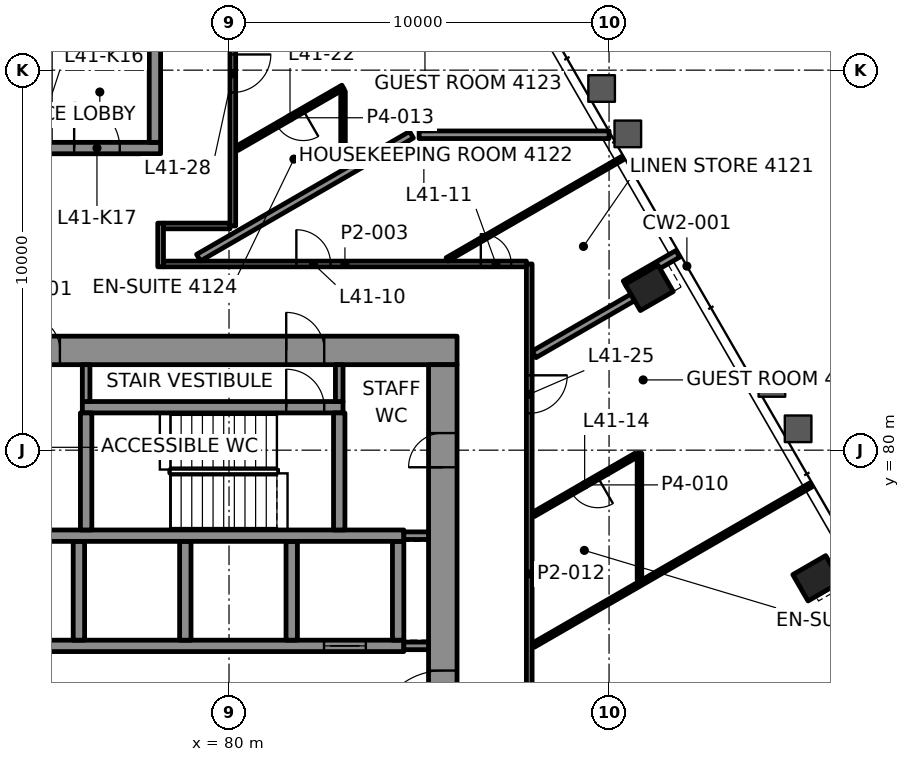
"""IFC4 building model, lengths in metres.
Left out: names, types, materials, properties, quantities, classifications, styles, units other than length and angle.
Written with IfcOpenShell. Run it as: python <this file> out.ifc"""

import sys

from ifc_helpers import new_model, si_unit, direction, frame, frame_2d, origin, origin_2d, place, context, subcontext, project, spatial, rectangle, hollow_rectangle, extrude, element, fill, save


model = new_model("IFC4")
c1 = context("Model", 3, precision=1e-05, world=origin(), true_north=direction((0.0, 1.0)))
c2 = subcontext(c1, "Body", "Model", "MODEL_VIEW")
j1 = project(units=[si_unit("LENGTHUNIT", "METRE"), si_unit("PLANEANGLEUNIT", "RADIAN")], contexts=[c1])
p1 = place(None, origin())
s1 = spatial("IfcSite", under=j1, at=p1, CompositionType="ELEMENT")
p2 = place(p1, origin())
s2 = spatial("IfcBuilding", under=s1, at=p2, CompositionType="ELEMENT")
p3 = place(p2, frame((0.0, 0.0, 179.2)))
s3 = spatial("IfcBuildingStorey", under=s2, at=p3, CompositionType="ELEMENT", Elevation=179.2)
for number, where, z_axis, x_axis in (
    (1, (95.468, 76.628, -0.0), (0.0, 0.0, 1.0), (-0.5, 0.866, 0.0)),
    (2, (91.056, 84.27, -0.0), (0.0, 0.0, 1.0), (-0.5, 0.866, 0.0)),
):
    element("IfcColumn", number, at=place(p3, frame(where, z_axis=z_axis, x_axis=x_axis)), inside=s3, PredefinedType="COLUMN", context=c2, shape_type="SweptSolid", body=[
        extrude(hollow_rectangle(XDim=0.8, YDim=1.0, WallThickness=0.05, at=origin_2d()), origin(), (0.0, 0.0, 1.0), 3.9),
    ])
p4 = place(p3, frame((64.0, 82.625, 0.0), z_axis=(0.0, 0.0, 1.0), x_axis=(1.0, 0.0, 0.0)))
e3 = element("IfcWall", 3, at=p4, inside=s3, PredefinedType="SHEAR", context=c2, shape_type="SweptSolid", body=[
    extrude(rectangle(XDim=22.0, YDim=0.75, at=frame_2d((11.0, 0.0))), origin(), (0.0, 0.0, 1.0), 3.7),
])
p5 = place(p4, frame((3.695, 0.0, 0.0)))
e4 = element("IfcOpeningElement", 4, at=p5, cuts=e3, PredefinedType="OPENING", context=c2, shape_type="SweptSolid", body=[
    extrude(rectangle(XDim=1.0, YDim=2.1, at=frame_2d((0.5, 1.05))), frame((0.0, 0.385, 0.0), z_axis=(0.0, -1.0, 0.0), x_axis=(1.0, 0.0, 0.0)), (0.0, 0.0, 1.0), 0.77),
])
p6 = place(p4, frame((17.505, 0.0, 0.0)))
e5 = element("IfcOpeningElement", 5, at=p6, cuts=e3, PredefinedType="OPENING", context=c2, shape_type="SweptSolid", body=[
    extrude(rectangle(XDim=1.0, YDim=2.1, at=frame_2d((0.5, 1.05))), frame((0.0, 0.385, 0.0), z_axis=(0.0, -1.0, 0.0), x_axis=(1.0, 0.0, 0.0)), (0.0, 0.0, 1.0), 0.77),
])
p7 = place(p4, frame((10.65, 0.0, 0.0)))
e6 = element("IfcOpeningElement", 6, at=p7, cuts=e3, PredefinedType="OPENING", context=c2, shape_type="SweptSolid", body=[
    extrude(rectangle(XDim=0.9, YDim=2.1, at=frame_2d((0.45, 1.05))), frame((0.0, 0.385, 0.0), z_axis=(0.0, -1.0, 0.0), x_axis=(1.0, 0.0, 0.0)), (0.0, 0.0, 1.0), 0.77),
])
p8 = place(p3, frame((85.625, 67.75, 0.0), z_axis=(0.0, 0.0, 1.0), x_axis=(0.0, 1.0, 0.0)))
e7 = element("IfcWall", 7, at=p8, inside=s3, PredefinedType="SHEAR", context=c2, shape_type="SweptSolid", body=[
    extrude(rectangle(XDim=14.5, YDim=0.75, at=frame_2d((7.25, 0.0))), origin(), (0.0, 0.0, 1.0), 3.7),
])
p9 = place(p8, frame((4.65, 0.0, 0.0)))
e8 = element("IfcOpeningElement", 8, at=p9, cuts=e7, PredefinedType="OPENING", context=c2, shape_type="SweptSolid", body=[
    extrude(rectangle(XDim=1.8, YDim=2.1, at=frame_2d((0.9, 1.05))), frame((0.0, 0.385, 0.0), z_axis=(0.0, -1.0, 0.0), x_axis=(1.0, 0.0, 0.0)), (0.0, 0.0, 1.0), 0.77),
])
p10 = place(p8, frame((11.8, 0.0, 0.0)))
e9 = element("IfcOpeningElement", 9, at=p10, cuts=e7, PredefinedType="OPENING", context=c2, shape_type="SweptSolid", body=[
    extrude(rectangle(XDim=0.9, YDim=2.1, at=frame_2d((0.45, 1.05))), frame((0.0, 0.385, 0.0), z_axis=(0.0, -1.0, 0.0), x_axis=(1.0, 0.0, 0.0)), (0.0, 0.0, 1.0), 0.77),
])
p11 = place(p3, frame((70.3, 74.85, 0.0), z_axis=(0.0, 0.0, 1.0), x_axis=(1.0, 0.0, 0.0)))
e10 = element("IfcWall", 10, at=p11, inside=s3, PredefinedType="SHEAR", context=c2, shape_type="SweptSolid", body=[
    extrude(rectangle(XDim=14.3, YDim=0.3, at=frame_2d((7.15, 0.0))), origin(), (0.0, 0.0, 1.0), 3.7),
])
p12 = place(p11, frame((3.8, 0.0, 0.0)))
e11 = element("IfcOpeningElement", 11, at=p12, cuts=e10, PredefinedType="OPENING", context=c2, shape_type="SweptSolid", body=[
    extrude(rectangle(XDim=1.1, YDim=2.1, at=frame_2d((0.55, 1.05))), frame((0.0, 0.16, 0.0), z_axis=(0.0, -1.0, 0.0), x_axis=(1.0, 0.0, 0.0)), (0.0, 0.0, 1.0), 0.32),
])
p13 = place(p11, frame((12.2, 0.0, 0.0)))
e12 = element("IfcOpeningElement", 12, at=p13, cuts=e10, PredefinedType="OPENING", context=c2, shape_type="SweptSolid", body=[
    extrude(rectangle(XDim=1.1, YDim=2.1, at=frame_2d((0.55, 1.05))), frame((0.0, 0.16, 0.0), z_axis=(0.0, -1.0, 0.0), x_axis=(1.0, 0.0, 0.0)), (0.0, 0.0, 1.0), 0.32),
])
for number, where, z_axis, x_axis in (
    (13, (76.05, 75.0, 0.0), (0.0, 0.0, 1.0), (0.0, 1.0, 0.0)),
    (14, (78.85, 75.0, 0.0), (0.0, 0.0, 1.0), (0.0, 1.0, 0.0)),
    (15, (81.65, 75.0, 0.0), (0.0, 0.0, 1.0), (0.0, 1.0, 0.0)),
    (16, (84.45, 75.0, 0.0), (0.0, 0.0, 1.0), (0.0, 1.0, 0.0)),
):
    element("IfcWall", number, at=place(p3, frame(where, z_axis=z_axis, x_axis=x_axis)), inside=s3, PredefinedType="SHEAR", context=c2, shape_type="SweptSolid", body=[
        extrude(rectangle(XDim=2.6, YDim=0.3, at=frame_2d((1.3, 0.0))), origin(), (0.0, 0.0, 1.0), 3.7),
    ])
p14 = place(p3, frame((67.15, 77.75, 0.0), z_axis=(0.0, 0.0, 1.0), x_axis=(1.0, 0.0, 0.0)))
e17 = element("IfcWall", 17, at=p14, inside=s3, PredefinedType="SHEAR", context=c2, shape_type="SweptSolid", body=[
    extrude(rectangle(XDim=17.45, YDim=0.3, at=frame_2d((8.725, 0.0))), origin(), (0.0, 0.0, 1.0), 3.7),
])
p15 = place(p14, frame((0.545, 0.0, 0.0)))
e18 = element("IfcOpeningElement", 18, at=p15, cuts=e17, PredefinedType="OPENING", context=c2, shape_type="SweptSolid", body=[
    extrude(rectangle(XDim=1.0, YDim=2.1, at=frame_2d((0.5, 1.05))), frame((0.0, 0.16, 0.0), z_axis=(0.0, -1.0, 0.0), x_axis=(1.0, 0.0, 0.0)), (0.0, 0.0, 1.0), 0.32),
])
p16 = place(p3, frame((76.14, 81.13, 0.0), z_axis=(0.0, 0.0, 1.0), x_axis=(1.0, 0.0, 0.0)))
e19 = element("IfcWall", 19, at=p16, inside=s3, PredefinedType="SHEAR", context=c2, shape_type="SweptSolid", body=[
    extrude(rectangle(XDim=6.86, YDim=0.3, at=frame_2d((3.43, 0.0))), origin(), (0.0, 0.0, 1.0), 3.7),
])
p17 = place(p16, frame((5.365, 0.0, 0.0)))
e20 = element("IfcOpeningElement", 20, at=p17, cuts=e19, PredefinedType="OPENING", context=c2, shape_type="SweptSolid", body=[
    extrude(rectangle(XDim=1.0, YDim=2.1, at=frame_2d((0.5, 1.05))), frame((0.0, 0.16, 0.0), z_axis=(0.0, -1.0, 0.0), x_axis=(1.0, 0.0, 0.0)), (0.0, 0.0, 1.0), 0.32),
])
for number, where, z_axis, x_axis in (
    (21, (76.24, 77.9, 0.0), (0.0, 0.0, 1.0), (0.0, 1.0, 0.0)),
    (22, (82.9, 77.9, 0.0), (0.0, 0.0, 1.0), (0.0, 1.0, 0.0)),
):
    element("IfcWall", number, at=place(p3, frame(where, z_axis=z_axis, x_axis=x_axis)), inside=s3, PredefinedType="SHEAR", context=c2, shape_type="SweptSolid", body=[
        extrude(rectangle(XDim=3.08, YDim=0.3, at=frame_2d((1.54, 0.0))), origin(), (0.0, 0.0, 1.0), 3.7),
    ])
p18 = place(p3, frame((71.8, 87.95, 0.0), z_axis=(0.0, 0.0, 1.0), x_axis=(1.0, 0.0, 0.0)))
e23 = element("IfcWall", 23, at=p18, inside=s3, PredefinedType="SHEAR", context=c2, shape_type="SweptSolid", body=[
    extrude(rectangle(XDim=6.4, YDim=0.3, at=frame_2d((3.2, 0.0))), origin(), (0.0, 0.0, 1.0), 3.7),
])
p19 = place(p18, frame((1.325, 0.0, 0.0)))
e24 = element("IfcOpeningElement", 24, at=p19, cuts=e23, PredefinedType="OPENING", context=c2, shape_type="SweptSolid", body=[
    extrude(rectangle(XDim=1.0, YDim=2.1, at=frame_2d((0.5, 1.05))), frame((0.0, 0.16, 0.0), z_axis=(0.0, -1.0, 0.0), x_axis=(1.0, 0.0, 0.0)), (0.0, 0.0, 1.0), 0.32),
])
p20 = place(p18, frame((4.125, 0.0, 0.0)))
e25 = element("IfcOpeningElement", 25, at=p20, cuts=e23, PredefinedType="OPENING", context=c2, shape_type="SweptSolid", body=[
    extrude(rectangle(XDim=1.2, YDim=2.1, at=frame_2d((0.6, 1.05))), frame((0.0, 0.16, 0.0), z_axis=(0.0, -1.0, 0.0), x_axis=(1.0, 0.0, 0.0)), (0.0, 0.0, 1.0), 0.32),
])
p21 = place(p3, frame((78.05, 88.1, 0.0), z_axis=(0.0, 0.0, 1.0), x_axis=(0.0, 1.0, 0.0)))
e26 = element("IfcWall", 26, at=p21, inside=s3, PredefinedType="SHEAR", context=c2, shape_type="SweptSolid", body=[
    extrude(rectangle(XDim=6.2, YDim=0.3, at=frame_2d((3.1, 0.0))), origin(), (0.0, 0.0, 1.0), 3.7),
])
p22 = place(p3, frame((78.275, 84.9, 0.0), z_axis=(0.0, 0.0, 1.0), x_axis=(1.0, 0.0, 0.0)))
e27 = element("IfcWall", 27, at=p22, inside=s3, PredefinedType="PARTITIONING", context=c2, shape_type="SweptSolid", body=[
    extrude(rectangle(XDim=9.55, YDim=0.15, at=frame_2d((4.775, 0.0))), origin(), (0.0, 0.0, 1.0), 3.1),
])
p23 = place(p22, frame((3.497, 0.0, 0.0)))
e28 = element("IfcOpeningElement", 28, at=p23, cuts=e27, PredefinedType="OPENING", context=c2, shape_type="SweptSolid", body=[
    extrude(rectangle(XDim=0.9, YDim=2.1, at=frame_2d((0.45, 1.05))), frame((0.0, 0.085, 0.0), z_axis=(0.0, -1.0, 0.0), x_axis=(1.0, 0.0, 0.0)), (0.0, 0.0, 1.0), 0.17),
])
p24 = place(p22, frame((8.351, 0.0, 0.0)))
e29 = element("IfcOpeningElement", 29, at=p24, cuts=e27, PredefinedType="OPENING", context=c2, shape_type="SweptSolid", body=[
    extrude(rectangle(XDim=0.8, YDim=2.1, at=frame_2d((0.4, 1.05))), frame((0.0, 0.085, 0.0), z_axis=(0.0, -1.0, 0.0), x_axis=(1.0, 0.0, 0.0)), (0.0, 0.0, 1.0), 0.17),
])
p25 = place(p3, frame((78.275, 85.9, 0.0), z_axis=(0.0, 0.0, 1.0), x_axis=(1.0, 0.0, 0.0)))
e30 = element("IfcWall", 30, at=p25, inside=s3, PredefinedType="PARTITIONING", context=c2, shape_type="SweptSolid", body=[
    extrude(rectangle(XDim=1.75, YDim=0.15, at=frame_2d((0.875, 0.0))), origin(), (0.0, 0.0, 1.0), 3.1),
])
p26 = place(p3, frame((83.06, 87.8, 0.0), z_axis=(0.0, 0.0, 1.0), x_axis=(1.0, 0.0, 0.0)))
e31 = element("IfcWall", 31, at=p26, inside=s3, PredefinedType="PARTITIONING", context=c2, shape_type="SweptSolid", body=[
    extrude(rectangle(XDim=0.564, YDim=0.12, at=frame_2d((0.282, 0.0))), origin(), (0.0, 0.0, 1.0), 3.1),
])
p27 = place(p3, frame((85.002, 88.3, 0.0), z_axis=(0.0, 0.0, 1.0), x_axis=(1.0, 0.0, 0.0)))
e32 = element("IfcWall", 32, at=p27, inside=s3, PredefinedType="PARTITIONING", context=c2, shape_type="SweptSolid", body=[
    extrude(rectangle(XDim=4.998, YDim=0.2, at=frame_2d((2.499, 0.0))), origin(), (0.0, 0.0, 1.0), 3.022),
])
p28 = place(p3, frame((88.01, 74.869, 0.0), z_axis=(0.0, 0.0, 1.0), x_axis=(0.866017924271, 0.500012954673, 0.0)))
e33 = element("IfcWall", 33, at=p28, inside=s3, PredefinedType="PARTITIONING", context=c2, shape_type="SweptSolid", body=[
    extrude(rectangle(XDim=8.439, YDim=0.12, at=frame_2d((4.219, 0.0))), origin(), (0.0, 0.0, 1.0), 3.022),
])
p29 = place(p3, frame((90.705, 79.865, 0.0), z_axis=(0.0, 0.0, 1.0), x_axis=(-0.866009247561, -0.500027982357, 0.0)))
e34 = element("IfcWall", 34, at=p29, inside=s3, PredefinedType="PARTITIONING", context=c2, shape_type="SweptSolid", body=[
    extrude(rectangle(XDim=3.113, YDim=0.12, at=frame_2d((1.556, 0.0))), origin(), (0.0, 0.0, 1.0), 3.1),
])
p30 = place(p29, frame((1.156, 0.0, 0.0)))
e35 = element("IfcOpeningElement", 35, at=p30, cuts=e34, PredefinedType="OPENING", context=c2, shape_type="SweptSolid", body=[
    extrude(rectangle(XDim=0.8, YDim=2.1, at=frame_2d((0.4, 1.05))), frame((0.0, 0.07, 0.0), z_axis=(0.0, -1.0, 0.0), x_axis=(1.0, 0.0, 0.0)), (0.0, 0.0, 1.0), 0.14),
])
p31 = place(p3, frame((88.027, 82.521, 0.0), z_axis=(0.0, 0.0, 1.0), x_axis=(0.866029639064, 0.499992664208, 0.0)))
e36 = element("IfcWall", 36, at=p31, inside=s3, PredefinedType="PARTITIONING", context=c2, shape_type="SweptSolid", body=[
    extrude(rectangle(XDim=2.998, YDim=0.2, at=frame_2d((1.499, 0.0))), origin(), (0.0, 0.0, 1.0), 3.1),
])
p32 = place(p3, frame((90.423, 84.367, 0.0), z_axis=(0.0, 0.0, 1.0), x_axis=(0.865989903783, 0.500061482766, 0.0)))
e37 = element("IfcWall", 37, at=p32, inside=s3, PredefinedType="PARTITIONING", context=c2, shape_type="SweptSolid", body=[
    extrude(rectangle(XDim=1.6, YDim=0.2, at=frame_2d((0.8, 0.0))), origin(), (0.0, 0.0, 1.0), 3.022),
])
p33 = place(p3, frame((85.737, 85.02, 0.0), z_axis=(0.0, 0.0, 1.0), x_axis=(0.8660338432, 0.499985382219, 0.0)))
e38 = element("IfcWall", 38, at=p33, inside=s3, PredefinedType="PARTITIONING", context=c2, shape_type="SweptSolid", body=[
    extrude(rectangle(XDim=5.332, YDim=0.1, at=frame_2d((2.666, 0.0))), origin(), (0.0, 0.0, 1.0), 3.022),
])
p34 = place(p3, frame((79.197, 85.065, 0.0), z_axis=(0.0, 0.0, 1.0), x_axis=(0.86602410867, 0.500002243197, 0.0)))
e39 = element("IfcWall", 39, at=p34, inside=s3, PredefinedType="PARTITIONING", context=c2, shape_type="SweptSolid", body=[
    extrude(rectangle(XDim=6.471, YDim=0.2, at=frame_2d((3.235, 0.0))), origin(), (0.0, 0.0, 1.0), 3.1),
])
p35 = place(p3, frame((83.0, 89.553, 0.0), z_axis=(0.0, 0.0, 1.0), x_axis=(-0.86604299788, -0.499969524894, 0.0)))
e40 = element("IfcWall", 40, at=p35, inside=s3, PredefinedType="PARTITIONING", context=c2, shape_type="SweptSolid", body=[
    extrude(rectangle(XDim=3.222, YDim=0.12, at=frame_2d((1.611, 0.0))), origin(), (0.0, 0.0, 1.0), 3.1),
])
p36 = place(p35, frame((1.211, 0.0, 0.0)))
e41 = element("IfcOpeningElement", 41, at=p36, cuts=e40, PredefinedType="OPENING", context=c2, shape_type="SweptSolid", body=[
    extrude(rectangle(XDim=0.8, YDim=2.1, at=frame_2d((0.4, 1.05))), frame((0.0, 0.07, 0.0), z_axis=(0.0, -1.0, 0.0), x_axis=(1.0, 0.0, 0.0)), (0.0, 0.0, 1.0), 0.14),
])
p37 = place(p3, frame((90.8, 76.59, 0.0), z_axis=(0.0, 0.0, 1.0), x_axis=(0.0, 1.0, 0.0)))
e42 = element("IfcWall", 42, at=p37, inside=s3, PredefinedType="PARTITIONING", context=c2, shape_type="SweptSolid", body=[
    extrude(rectangle(XDim=3.329, YDim=0.12, at=frame_2d((1.665, 0.0))), origin(), (0.0, 0.0, 1.0), 3.1),
])
p38 = place(p3, frame((87.9, 84.9, 0.0), z_axis=(0.0, 0.0, 1.0), x_axis=(0.0, -1.0, 0.0)))
e43 = element("IfcWall", 43, at=p38, inside=s3, PredefinedType="PARTITIONING", context=c2, shape_type="SweptSolid", body=[
    extrude(rectangle(XDim=16.308, YDim=0.15, at=frame_2d((8.154, 0.0))), origin(), (0.0, 0.0, 1.0), 3.1),
])
p39 = place(p38, frame((2.93, 0.0, 0.0)))
e44 = element("IfcOpeningElement", 44, at=p39, cuts=e43, PredefinedType="OPENING", context=c2, shape_type="SweptSolid", body=[
    extrude(rectangle(XDim=1.0, YDim=2.1, at=frame_2d((0.5, 1.05))), frame((0.0, 0.085, 0.0), z_axis=(0.0, -1.0, 0.0), x_axis=(1.0, 0.0, 0.0)), (0.0, 0.0, 1.0), 0.17),
])
p40 = place(p38, frame((12.5, 0.0, 0.0)))
e45 = element("IfcOpeningElement", 45, at=p40, cuts=e43, PredefinedType="OPENING", context=c2, shape_type="SweptSolid", body=[
    extrude(rectangle(XDim=1.2, YDim=2.1, at=frame_2d((0.6, 1.05))), frame((0.0, 0.085, 0.0), z_axis=(0.0, -1.0, 0.0), x_axis=(1.0, 0.0, 0.0)), (0.0, 0.0, 1.0), 0.17),
])
p41 = place(p3, frame((83.0, 87.8, 0.0), z_axis=(0.0, 0.0, 1.0), x_axis=(0.0, 1.0, 0.0)))
e46 = element("IfcWall", 46, at=p41, inside=s3, PredefinedType="PARTITIONING", context=c2, shape_type="SweptSolid", body=[
    extrude(rectangle(XDim=1.644, YDim=0.12, at=frame_2d((0.822, 0.0))), origin(), (0.0, 0.0, 1.0), 3.1),
])
p42 = place(p3, frame((80.1, 96.5, 0.0), z_axis=(0.0, 0.0, 1.0), x_axis=(0.0, -1.0, 0.0)))
e47 = element("IfcWall", 47, at=p42, inside=s3, PredefinedType="PARTITIONING", context=c2, shape_type="SweptSolid", body=[
    extrude(rectangle(XDim=10.6, YDim=0.15, at=frame_2d((5.3, 0.0))), origin(), (0.0, 0.0, 1.0), 3.022),
])
p43 = place(p42, frame((0.377, 0.0, 0.0)))
e48 = element("IfcOpeningElement", 48, at=p43, cuts=e47, PredefinedType="OPENING", context=c2, shape_type="SweptSolid", body=[
    extrude(rectangle(XDim=1.0, YDim=2.1, at=frame_2d((0.5, 1.05))), frame((0.0, 0.085, 0.0), z_axis=(0.0, -1.0, 0.0), x_axis=(1.0, 0.0, 0.0)), (0.0, 0.0, 1.0), 0.17),
])
p44 = place(p42, frame((6.087, 0.0, 0.0)))
e49 = element("IfcOpeningElement", 49, at=p44, cuts=e47, PredefinedType="OPENING", context=c2, shape_type="SweptSolid", body=[
    extrude(rectangle(XDim=1.0, YDim=2.1, at=frame_2d((0.5, 1.05))), frame((0.0, 0.085, 0.0), z_axis=(0.0, -1.0, 0.0), x_axis=(1.0, 0.0, 0.0)), (0.0, 0.0, 1.0), 0.17),
])
p45 = place(p3, frame((78.2, 84.825, 0.0), z_axis=(0.0, 0.0, 1.0), x_axis=(0.0, 1.0, 0.0)))
e50 = element("IfcWall", 50, at=p45, inside=s3, PredefinedType="PARTITIONING", context=c2, shape_type="SweptSolid", body=[
    extrude(rectangle(XDim=1.15, YDim=0.15, at=frame_2d((0.575, 0.0))), origin(), (0.0, 0.0, 1.0), 3.1),
])
for number, where, z_axis, x_axis in (
    (51, (84.6, 74.85, 0.0), (0.0, 0.0, 1.0), (1.0, 0.0, 0.0)),
    (52, (84.6, 77.75, 0.0), (0.0, 0.0, 1.0), (1.0, 0.0, 0.0)),
):
    element("IfcWall", number, at=place(p3, frame(where, z_axis=z_axis, x_axis=x_axis)), inside=s3, PredefinedType="PARTITIONING", context=c2, shape_type="SweptSolid", body=[
        extrude(rectangle(XDim=0.65, YDim=0.2, at=frame_2d((0.325, 0.0))), origin(), (0.0, 0.0, 1.0), 3.7),
    ])
for number, where, z_axis, x_axis in (
    (53, (76.24, 81.28, 0.0), (0.0, 0.0, 1.0), (0.0, 1.0, 0.0)),
    (54, (82.9, 81.28, 0.0), (0.0, 0.0, 1.0), (0.0, 1.0, 0.0)),
):
    element("IfcWall", number, at=place(p3, frame(where, z_axis=z_axis, x_axis=x_axis)), inside=s3, PredefinedType="PARTITIONING", context=c2, shape_type="SweptSolid", body=[
        extrude(rectangle(XDim=0.97, YDim=0.2, at=frame_2d((0.485, 0.0))), origin(), (0.0, 0.0, 1.0), 3.7),
    ])
p46 = place(p23, origin())
e55 = element("IfcDoor", 55, at=p46, inside=s3, OperationType="SINGLE_SWING_LEFT", PredefinedType="DOOR", context=c2, shape_type="SweptSolid", body=[
    extrude(rectangle(XDim=0.9, YDim=2.1, at=frame_2d((0.45, 1.05))), frame((0.0, 0.025, 0.0), z_axis=(0.0, -1.0, 0.0), x_axis=(1.0, 0.0, 0.0)), (0.0, 0.0, 1.0), 0.05),
])
fill(e28, e55)
p47 = place(p24, origin())
e56 = element("IfcDoor", 56, at=p47, inside=s3, OperationType="SINGLE_SWING_RIGHT", PredefinedType="DOOR", context=c2, shape_type="SweptSolid", body=[
    extrude(rectangle(XDim=0.8, YDim=2.1, at=frame_2d((0.4, 1.05))), frame((0.0, 0.025, 0.0), z_axis=(0.0, -1.0, 0.0), x_axis=(1.0, 0.0, 0.0)), (0.0, 0.0, 1.0), 0.05),
])
fill(e29, e56)
p48 = place(p30, origin())
e57 = element("IfcDoor", 57, at=p48, inside=s3, OperationType="SINGLE_SWING_RIGHT", PredefinedType="DOOR", context=c2, shape_type="SweptSolid", body=[
    extrude(rectangle(XDim=0.8, YDim=2.1, at=frame_2d((0.4, 1.05))), frame((0.0, 0.025, 0.0), z_axis=(0.0, -1.0, 0.0), x_axis=(1.0, 0.0, 0.0)), (0.0, 0.0, 1.0), 0.05),
])
fill(e35, e57)
p49 = place(p36, origin())
e58 = element("IfcDoor", 58, at=p49, inside=s3, OperationType="SINGLE_SWING_RIGHT", PredefinedType="DOOR", context=c2, shape_type="SweptSolid", body=[
    extrude(rectangle(XDim=0.8, YDim=2.1, at=frame_2d((0.4, 1.05))), frame((0.0, 0.025, 0.0), z_axis=(0.0, -1.0, 0.0), x_axis=(1.0, 0.0, 0.0)), (0.0, 0.0, 1.0), 0.05),
])
fill(e41, e58)
p50 = place(p39, origin())
e59 = element("IfcDoor", 59, at=p50, inside=s3, OperationType="SINGLE_SWING_LEFT", PredefinedType="DOOR", context=c2, shape_type="SweptSolid", body=[
    extrude(rectangle(XDim=1.0, YDim=2.1, at=frame_2d((0.5, 1.05))), frame((0.0, 0.025, 0.0), z_axis=(0.0, -1.0, 0.0), x_axis=(1.0, 0.0, 0.0)), (0.0, 0.0, 1.0), 0.05),
])
fill(e44, e59)
p51 = place(p44, origin())
e60 = element("IfcDoor", 60, at=p51, inside=s3, OperationType="SINGLE_SWING_LEFT", PredefinedType="DOOR", context=c2, shape_type="SweptSolid", body=[
    extrude(rectangle(XDim=1.0, YDim=2.1, at=frame_2d((0.5, 1.05))), frame((0.0, 0.025, 0.0), z_axis=(0.0, -1.0, 0.0), x_axis=(1.0, 0.0, 0.0)), (0.0, 0.0, 1.0), 0.05),
])
fill(e49, e60)
p52 = place(p13, origin())
e61 = element("IfcDoor", 61, at=p52, inside=s3, OperationType="DOUBLE_DOOR_SLIDING", PredefinedType="DOOR", context=c2, shape_type="SweptSolid", body=[
    extrude(rectangle(XDim=1.1, YDim=2.1, at=frame_2d((0.55, 1.05))), frame((0.0, 0.025, 0.0), z_axis=(0.0, -1.0, 0.0), x_axis=(1.0, 0.0, 0.0)), (0.0, 0.0, 1.0), 0.05),
])
fill(e12, e61)
p53 = place(p17, origin())
e62 = element("IfcDoor", 62, at=p53, inside=s3, OperationType="SINGLE_SWING_RIGHT", PredefinedType="DOOR", context=c2, shape_type="SweptSolid", body=[
    extrude(rectangle(XDim=1.0, YDim=2.1, at=frame_2d((0.5, 1.05))), frame((0.0, 0.025, 0.0), z_axis=(0.0, -1.0, 0.0), x_axis=(1.0, 0.0, 0.0)), (0.0, 0.0, 1.0), 0.05),
])
fill(e20, e62)
p54 = place(p6, origin())
e63 = element("IfcDoor", 63, at=p54, inside=s3, OperationType="SINGLE_SWING_LEFT", PredefinedType="DOOR", context=c2, shape_type="SweptSolid", body=[
    extrude(rectangle(XDim=1.0, YDim=2.1, at=frame_2d((0.5, 1.05))), frame((0.0, 0.095, 0.0), z_axis=(0.0, -1.0, 0.0), x_axis=(1.0, 0.0, 0.0)), (0.0, 0.0, 1.0), 0.19),
])
fill(e5, e63)
p55 = place(p20, origin())
e64 = element("IfcDoor", 64, at=p55, inside=s3, OperationType="SINGLE_SWING_RIGHT", PredefinedType="DOOR", context=c2, shape_type="SweptSolid", body=[
    extrude(rectangle(XDim=1.2, YDim=2.1, at=frame_2d((0.6, 1.05))), frame((0.0, 0.025, 0.0), z_axis=(0.0, -1.0, 0.0), x_axis=(1.0, 0.0, 0.0)), (0.0, 0.0, 1.0), 0.05),
])
fill(e25, e64)
p56 = place(p9, origin())
e65 = element("IfcDoor", 65, at=p56, inside=s3, OperationType="SINGLE_SWING_RIGHT", PredefinedType="DOOR", context=c2, shape_type="SweptSolid", body=[
    extrude(rectangle(XDim=1.8, YDim=2.1, at=frame_2d((0.9, 1.05))), frame((0.0, 0.095, 0.0), z_axis=(0.0, -1.0, 0.0), x_axis=(1.0, 0.0, 0.0)), (0.0, 0.0, 1.0), 0.19),
])
fill(e8, e65)
p57 = place(p7, origin())
e66 = element("IfcDoor", 66, at=p57, inside=s3, OperationType="SINGLE_SWING_RIGHT", PredefinedType="DOOR", context=c2, shape_type="SweptSolid", body=[
    extrude(rectangle(XDim=0.9, YDim=2.1, at=frame_2d((0.45, 1.05))), frame((0.0, 0.095, 0.0), z_axis=(0.0, -1.0, 0.0), x_axis=(1.0, 0.0, 0.0)), (0.0, 0.0, 1.0), 0.19),
])
fill(e6, e66)
p58 = place(p10, origin())
e67 = element("IfcDoor", 67, at=p58, inside=s3, OperationType="SINGLE_SWING_LEFT", PredefinedType="DOOR", context=c2, shape_type="SweptSolid", body=[
    extrude(rectangle(XDim=0.9, YDim=2.1, at=frame_2d((0.45, 1.05))), frame((0.0, 0.095, 0.0), z_axis=(0.0, -1.0, 0.0), x_axis=(1.0, 0.0, 0.0)), (0.0, 0.0, 1.0), 0.19),
])
fill(e9, e67)
save(model, sys.argv[1])
